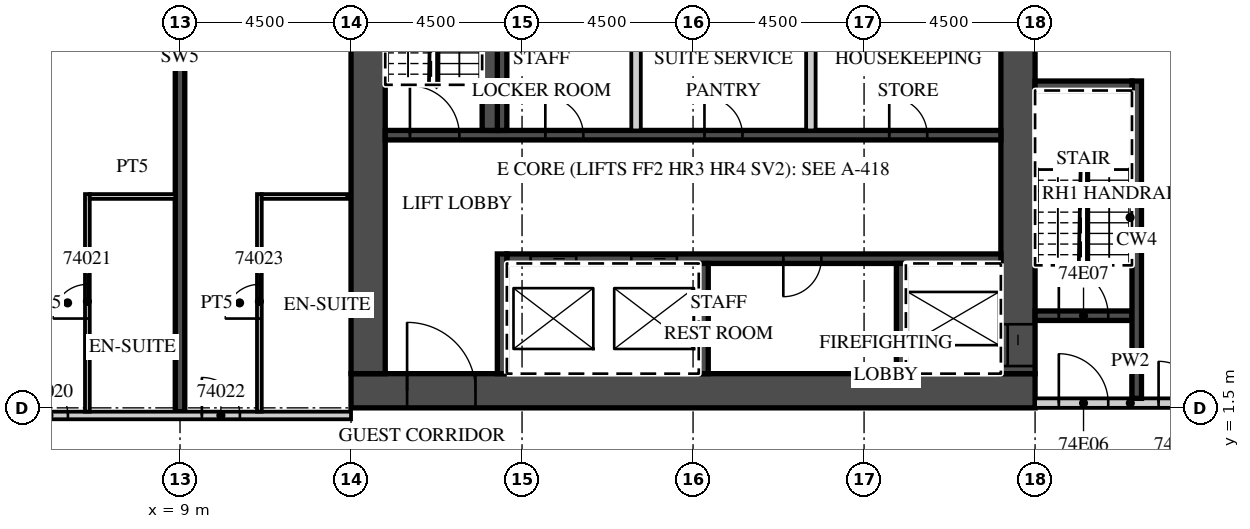
"""IFC4 building model, lengths in metres.
Left out: names, types, materials, properties, quantities, classifications, styles, units other than length and angle.
Written with IfcOpenShell. Run it as: python <this file> out.ifc"""

import sys

from ifc_helpers import new_model, si_unit, direction, frame, frame_2d, origin, place, context, subcontext, project, spatial, rectangle, extrude, element, fill, save


model = new_model("IFC4")
c1 = context("Model", 3, precision=1e-05, world=origin(), true_north=direction((0.0, 1.0)))
c2 = subcontext(c1, "Body", "Model", "MODEL_VIEW")
j1 = project(units=[si_unit("LENGTHUNIT", "METRE"), si_unit("PLANEANGLEUNIT", "RADIAN")], contexts=[c1])
p1 = place(None, origin())
s1 = spatial("IfcSite", under=j1, at=p1, CompositionType="ELEMENT")
p2 = place(p1, origin())
s2 = spatial("IfcBuilding", under=s1, at=p2, CompositionType="ELEMENT")
p3 = place(p2, frame((0.0, 0.0, 294.9)))
s3 = spatial("IfcBuildingStorey", under=s2, at=p3, CompositionType="ELEMENT", Elevation=294.9)
p4 = place(p3, frame((9.0, 1.4, 0.0), z_axis=(0.0, 0.0, 1.0), x_axis=(0.0, 1.0, 0.0)))
e1 = element("IfcWall", 1, at=p4, inside=s3, PredefinedType="SHEAR", context=c2, shape_type="SweptSolid", body=[
    extrude(rectangle(XDim=18.629, YDim=0.25, at=frame_2d((9.315, 0.0))), origin(), (0.0, 0.0, 1.0), 3.3),
])
p5 = place(p3, frame((38.132, -12.858, 0.0), z_axis=(0.0, 0.0, 1.0), x_axis=(-0.095847749461, 0.995396006082, 0.0)))
e2 = element("IfcWall", 2, at=p5, inside=s3, PredefinedType="SOLIDWALL", context=c2, shape_type="SweptSolid", body=[
    extrude(rectangle(XDim=32.0, YDim=0.45, at=frame_2d((16.0, 0.0))), origin(), (0.0, 0.0, 1.0), 3.02),
])
p6 = place(p3, frame((-39.909, 1.3, 0.0), z_axis=(0.0, 0.0, 1.0), x_axis=(1.0, 0.0, 0.0)))
e3 = element("IfcWall", 3, at=p6, inside=s3, PredefinedType="PARTITIONING", context=c2, shape_type="SweptSolid", body=[
    extrude(rectangle(XDim=53.409, YDim=0.2, at=frame_2d((26.705, 0.0))), origin(), (0.0, 0.0, 1.0), 3.02),
])
p7 = place(p6, frame((0.255, 0.0, 0.0)))
e4 = element("IfcOpeningElement", 4, at=p7, cuts=e3, PredefinedType="OPENING", context=c2, shape_type="SweptSolid", body=[
    extrude(rectangle(XDim=0.9, YDim=2.1, at=frame_2d((0.45, 1.05))), frame((0.0, 0.11, 0.0), z_axis=(0.0, -1.0, 0.0), x_axis=(1.0, 0.0, 0.0)), (0.0, 0.0, 1.0), 0.22),
])
p8 = place(p6, frame((4.484, 0.0, 0.0)))
e5 = element("IfcOpeningElement", 5, at=p8, cuts=e3, PredefinedType="OPENING", context=c2, shape_type="SweptSolid", body=[
    extrude(rectangle(XDim=1.0, YDim=2.1, at=frame_2d((0.5, 1.05))), frame((0.0, 0.11, 0.0), z_axis=(0.0, -1.0, 0.0), x_axis=(1.0, 0.0, 0.0)), (0.0, 0.0, 1.0), 0.22),
])
p9 = place(p6, frame((11.334, 0.0, 0.0)))
e6 = element("IfcOpeningElement", 6, at=p9, cuts=e3, PredefinedType="OPENING", context=c2, shape_type="SweptSolid", body=[
    extrude(rectangle(XDim=1.0, YDim=2.1, at=frame_2d((0.5, 1.05))), frame((0.0, 0.11, 0.0), z_axis=(0.0, -1.0, 0.0), x_axis=(1.0, 0.0, 0.0)), (0.0, 0.0, 1.0), 0.22),
])
p10 = place(p6, frame((15.347, 0.0, 0.0)))
e7 = element("IfcOpeningElement", 7, at=p10, cuts=e3, PredefinedType="OPENING", context=c2, shape_type="SweptSolid", body=[
    extrude(rectangle(XDim=1.2, YDim=2.1, at=frame_2d((0.6, 1.05))), frame((0.0, 0.11, 0.0), z_axis=(0.0, -1.0, 0.0), x_axis=(1.0, 0.0, 0.0)), (0.0, 0.0, 1.0), 0.22),
])
p11 = place(p6, frame((24.859, 0.0, 0.0)))
e8 = element("IfcOpeningElement", 8, at=p11, cuts=e3, PredefinedType="OPENING", context=c2, shape_type="SweptSolid", body=[
    extrude(rectangle(XDim=1.0, YDim=2.1, at=frame_2d((0.5, 1.05))), frame((0.0, 0.11, 0.0), z_axis=(0.0, -1.0, 0.0), x_axis=(1.0, 0.0, 0.0)), (0.0, 0.0, 1.0), 0.22),
])
p12 = place(p6, frame((26.959, 0.0, 0.0)))
e9 = element("IfcOpeningElement", 9, at=p12, cuts=e3, PredefinedType="OPENING", context=c2, shape_type="SweptSolid", body=[
    extrude(rectangle(XDim=1.0, YDim=2.1, at=frame_2d((0.5, 1.05))), frame((0.0, 0.11, 0.0), z_axis=(0.0, -1.0, 0.0), x_axis=(1.0, 0.0, 0.0)), (0.0, 0.0, 1.0), 0.22),
])
p13 = place(p6, frame((33.346, 0.0, 0.0)))
e10 = element("IfcOpeningElement", 10, at=p13, cuts=e3, PredefinedType="OPENING", context=c2, shape_type="SweptSolid", body=[
    extrude(rectangle(XDim=1.2, YDim=2.1, at=frame_2d((0.6, 1.05))), frame((0.0, 0.11, 0.0), z_axis=(0.0, -1.0, 0.0), x_axis=(1.0, 0.0, 0.0)), (0.0, 0.0, 1.0), 0.22),
])
p14 = place(p6, frame((42.859, 0.0, 0.0)))
e11 = element("IfcOpeningElement", 11, at=p14, cuts=e3, PredefinedType="OPENING", context=c2, shape_type="SweptSolid", body=[
    extrude(rectangle(XDim=1.0, YDim=2.1, at=frame_2d((0.5, 1.05))), frame((0.0, 0.11, 0.0), z_axis=(0.0, -1.0, 0.0), x_axis=(1.0, 0.0, 0.0)), (0.0, 0.0, 1.0), 0.22),
])
p15 = place(p6, frame((44.959, 0.0, 0.0)))
e12 = element("IfcOpeningElement", 12, at=p15, cuts=e3, PredefinedType="OPENING", context=c2, shape_type="SweptSolid", body=[
    extrude(rectangle(XDim=1.0, YDim=2.1, at=frame_2d((0.5, 1.05))), frame((0.0, 0.11, 0.0), z_axis=(0.0, -1.0, 0.0), x_axis=(1.0, 0.0, 0.0)), (0.0, 0.0, 1.0), 0.22),
])
p16 = place(p6, frame((49.484, 0.0, 0.0)))
e13 = element("IfcOpeningElement", 13, at=p16, cuts=e3, PredefinedType="OPENING", context=c2, shape_type="SweptSolid", body=[
    extrude(rectangle(XDim=1.0, YDim=2.1, at=frame_2d((0.5, 1.05))), frame((0.0, 0.11, 0.0), z_axis=(0.0, -1.0, 0.0), x_axis=(1.0, 0.0, 0.0)), (0.0, 0.0, 1.0), 0.22),
])
p17 = place(p3, frame((6.562, 1.4, 0.0), z_axis=(0.0, 0.0, 1.0), x_axis=(0.0, 1.0, 0.0)))
e14 = element("IfcWall", 14, at=p17, inside=s3, PredefinedType="PARTITIONING", context=c2, shape_type="SweptSolid", body=[
    extrude(rectangle(XDim=5.725, YDim=0.125, at=frame_2d((2.863, 0.0))), origin(), (0.0, 0.0, 1.0), 3.02),
])
p18 = place(p17, frame((2.45, 0.0, 0.0)))
e15 = element("IfcOpeningElement", 15, at=p18, cuts=e14, PredefinedType="OPENING", context=c2, shape_type="SweptSolid", body=[
    extrude(rectangle(XDim=0.9, YDim=2.1, at=frame_2d((0.45, 1.05))), frame((0.0, 0.073, 0.0), z_axis=(0.0, -1.0, 0.0), x_axis=(1.0, 0.0, 0.0)), (0.0, 0.0, 1.0), 0.145),
])
p19 = place(p3, frame((6.625, 7.062, 0.0), z_axis=(0.0, 0.0, 1.0), x_axis=(1.0, 0.0, 0.0)))
e16 = element("IfcWall", 16, at=p19, inside=s3, PredefinedType="PARTITIONING", context=c2, shape_type="SweptSolid", body=[
    extrude(rectangle(XDim=2.25, YDim=0.125, at=frame_2d((1.125, 0.0))), origin(), (0.0, 0.0, 1.0), 3.02),
])
p20 = place(p3, frame((11.088, 1.4, 0.0), z_axis=(0.0, 0.0, 1.0), x_axis=(0.0, 1.0, 0.0)))
e17 = element("IfcWall", 17, at=p20, inside=s3, PredefinedType="PARTITIONING", context=c2, shape_type="SweptSolid", body=[
    extrude(rectangle(XDim=5.725, YDim=0.125, at=frame_2d((2.863, 0.0))), origin(), (0.0, 0.0, 1.0), 3.02),
])
p21 = place(p20, frame((2.45, 0.0, 0.0)))
e18 = element("IfcOpeningElement", 18, at=p21, cuts=e17, PredefinedType="OPENING", context=c2, shape_type="SweptSolid", body=[
    extrude(rectangle(XDim=0.9, YDim=2.1, at=frame_2d((0.45, 1.05))), frame((0.0, 0.073, 0.0), z_axis=(0.0, -1.0, 0.0), x_axis=(1.0, 0.0, 0.0)), (0.0, 0.0, 1.0), 0.145),
])
p22 = place(p3, frame((11.15, 7.062, 0.0), z_axis=(0.0, 0.0, 1.0), x_axis=(1.0, 0.0, 0.0)))
e19 = element("IfcWall", 19, at=p22, inside=s3, PredefinedType="PARTITIONING", context=c2, shape_type="SweptSolid", body=[
    extrude(rectangle(XDim=2.25, YDim=0.125, at=frame_2d((1.125, 0.0))), origin(), (0.0, 0.0, 1.0), 3.02),
])
p23 = place(p3, frame((13.5, 1.95, 0.0), z_axis=(0.0, 0.0, 1.0), x_axis=(1.0, 0.0, 0.0)))
e20 = element("IfcWall", 20, at=p23, inside=s3, PredefinedType="SHEAR", context=c2, shape_type="SweptSolid", body=[
    extrude(rectangle(XDim=18.0, YDim=0.9, at=frame_2d((9.0, 0.0))), origin(), (0.0, 0.0, 1.0), 3.02),
])
p24 = place(p23, frame((1.475, 0.0, 0.0)))
e21 = element("IfcOpeningElement", 21, at=p24, cuts=e20, PredefinedType="OPENING", context=c2, shape_type="SweptSolid", body=[
    extrude(rectangle(XDim=1.8, YDim=2.1, at=frame_2d((0.9, 1.05))), frame((0.0, 0.46, 0.0), z_axis=(0.0, -1.0, 0.0), x_axis=(1.0, 0.0, 0.0)), (0.0, 0.0, 1.0), 0.92),
])
p25 = place(p3, frame((31.05, 2.4, 0.0), z_axis=(0.0, 0.0, 1.0), x_axis=(0.0, 1.0, 0.0)))
e22 = element("IfcWall", 22, at=p25, inside=s3, PredefinedType="SHEAR", context=c2, shape_type="SweptSolid", body=[
    extrude(rectangle(XDim=12.8, YDim=0.9, at=frame_2d((6.4, 0.0))), origin(), (0.0, 0.0, 1.0), 3.02),
])
p26 = place(p25, frame((0.2, 0.0, 0.0)))
e23 = element("IfcOpeningElement", 23, at=p26, cuts=e22, PredefinedType="OPENING", context=c2, shape_type="SweptSolid", body=[
    extrude(rectangle(XDim=1.1, YDim=2.1, at=frame_2d((0.55, 1.05))), frame((0.0, 0.46, 0.0), z_axis=(0.0, -1.0, 0.0), x_axis=(1.0, 0.0, 0.0)), (0.0, 0.0, 1.0), 0.92),
])
p27 = place(p3, frame((13.95, 2.4, 0.0), z_axis=(0.0, 0.0, 1.0), x_axis=(0.0, 1.0, 0.0)))
e24 = element("IfcWall", 24, at=p27, inside=s3, PredefinedType="SHEAR", context=c2, shape_type="SweptSolid", body=[
    extrude(rectangle(XDim=12.2, YDim=0.9, at=frame_2d((6.1, 0.0))), origin(), (0.0, 0.0, 1.0), 3.02),
])
p28 = place(p3, frame((17.6, 5.425, 0.0), z_axis=(0.0, 0.0, 1.0), x_axis=(1.0, 0.0, 0.0)))
e25 = element("IfcWall", 25, at=p28, inside=s3, PredefinedType="SHEAR", context=c2, shape_type="SweptSolid", body=[
    extrude(rectangle(XDim=13.0, YDim=0.25, at=frame_2d((6.5, 0.0))), origin(), (0.0, 0.0, 1.0), 3.02),
])
p29 = place(p28, frame((3.275, 0.0, 0.0)))
e26 = element("IfcOpeningElement", 26, at=p29, cuts=e25, PredefinedType="OPENING", context=c2, shape_type="SweptSolid", body=[
    extrude(rectangle(XDim=1.2, YDim=2.1, at=frame_2d((0.6, 1.05))), frame((0.0, 0.135, 0.0), z_axis=(0.0, -1.0, 0.0), x_axis=(1.0, 0.0, 0.0)), (0.0, 0.0, 1.0), 0.27),
])
p30 = place(p28, frame((0.625, 0.0, 0.0)))
e27 = element("IfcOpeningElement", 27, at=p30, cuts=e25, PredefinedType="OPENING", context=c2, shape_type="SweptSolid", body=[
    extrude(rectangle(XDim=1.2, YDim=2.1, at=frame_2d((0.6, 1.05))), frame((0.0, 0.135, 0.0), z_axis=(0.0, -1.0, 0.0), x_axis=(1.0, 0.0, 0.0)), (0.0, 0.0, 1.0), 0.27),
])
p31 = place(p28, frame((7.275, 0.0, 0.0)))
e28 = element("IfcOpeningElement", 28, at=p31, cuts=e25, PredefinedType="OPENING", context=c2, shape_type="SweptSolid", body=[
    extrude(rectangle(XDim=1.0, YDim=2.1, at=frame_2d((0.5, 1.05))), frame((0.0, 0.135, 0.0), z_axis=(0.0, -1.0, 0.0), x_axis=(1.0, 0.0, 0.0)), (0.0, 0.0, 1.0), 0.27),
])
p32 = place(p3, frame((17.475, 2.4, 0.0), z_axis=(0.0, 0.0, 1.0), x_axis=(0.0, 1.0, 0.0)))
e29 = element("IfcWall", 29, at=p32, inside=s3, PredefinedType="SHEAR", context=c2, shape_type="SweptSolid", body=[
    extrude(rectangle(XDim=3.15, YDim=0.25, at=frame_2d((1.575, 0.0))), origin(), (0.0, 0.0, 1.0), 3.02),
])
for number, where, z_axis, x_axis in (
    (30, (27.975, 2.4, 0.0), (0.0, 0.0, 1.0), (0.0, 1.0, 0.0)),
    (31, (22.775, 2.4, 0.0), (0.0, 0.0, 1.0), (0.0, 1.0, 0.0)),
):
    element("IfcWall", number, at=place(p3, frame(where, z_axis=z_axis, x_axis=x_axis)), inside=s3, PredefinedType="SHEAR", context=c2, shape_type="SweptSolid", body=[
        extrude(rectangle(XDim=2.9, YDim=0.25, at=frame_2d((1.45, 0.0))), origin(), (0.0, 0.0, 1.0), 3.02),
    ])
p33 = place(p3, frame((14.4, 8.675, 0.0), z_axis=(0.0, 0.0, 1.0), x_axis=(1.0, 0.0, 0.0)))
e32 = element("IfcWall", 32, at=p33, inside=s3, PredefinedType="SHEAR", context=c2, shape_type="SweptSolid", body=[
    extrude(rectangle(XDim=16.2, YDim=0.25, at=frame_2d((8.1, 0.0))), origin(), (0.0, 0.0, 1.0), 3.02),
])
p34 = place(p33, frame((0.65, 0.0, 0.0)))
e33 = element("IfcOpeningElement", 33, at=p34, cuts=e32, PredefinedType="OPENING", context=c2, shape_type="SweptSolid", body=[
    extrude(rectangle(XDim=1.3, YDim=2.1, at=frame_2d((0.65, 1.05))), frame((0.0, 0.135, 0.0), z_axis=(0.0, -1.0, 0.0), x_axis=(1.0, 0.0, 0.0)), (0.0, 0.0, 1.0), 0.27),
])
p35 = place(p33, frame((13.262, 0.0, 0.0)))
e34 = element("IfcOpeningElement", 34, at=p35, cuts=e32, PredefinedType="OPENING", context=c2, shape_type="SweptSolid", body=[
    extrude(rectangle(XDim=1.0, YDim=2.1, at=frame_2d((0.5, 1.05))), frame((0.0, 0.135, 0.0), z_axis=(0.0, -1.0, 0.0), x_axis=(1.0, 0.0, 0.0)), (0.0, 0.0, 1.0), 0.27),
])
p36 = place(p33, frame((8.4, 0.0, 0.0)))
e35 = element("IfcOpeningElement", 35, at=p36, cuts=e32, PredefinedType="OPENING", context=c2, shape_type="SweptSolid", body=[
    extrude(rectangle(XDim=1.0, YDim=2.1, at=frame_2d((0.5, 1.05))), frame((0.0, 0.135, 0.0), z_axis=(0.0, -1.0, 0.0), x_axis=(1.0, 0.0, 0.0)), (0.0, 0.0, 1.0), 0.27),
])
p37 = place(p33, frame((4.212, 0.0, 0.0)))
e36 = element("IfcOpeningElement", 36, at=p37, cuts=e32, PredefinedType="OPENING", context=c2, shape_type="SweptSolid", body=[
    extrude(rectangle(XDim=1.0, YDim=2.1, at=frame_2d((0.5, 1.05))), frame((0.0, 0.135, 0.0), z_axis=(0.0, -1.0, 0.0), x_axis=(1.0, 0.0, 0.0)), (0.0, 0.0, 1.0), 0.27),
])
p38 = place(p3, frame((17.475, 8.8, 0.0), z_axis=(0.0, 0.0, 1.0), x_axis=(0.0, 1.0, 0.0)))
e37 = element("IfcWall", 37, at=p38, inside=s3, PredefinedType="SHEAR", context=c2, shape_type="SweptSolid", body=[
    extrude(rectangle(XDim=2.9, YDim=0.25, at=frame_2d((1.45, 0.0))), origin(), (0.0, 0.0, 1.0), 3.02),
])
for number, where, z_axis, x_axis in (
    (38, (25.6, 8.8, 0.0), (0.0, 0.0, 1.0), (0.0, 1.0, 0.0)),
    (39, (21.0, 8.8, 0.0), (0.0, 0.0, 1.0), (0.0, 1.0, 0.0)),
):
    element("IfcWall", number, at=place(p3, frame(where, z_axis=z_axis, x_axis=x_axis)), inside=s3, PredefinedType="PARTITIONING", context=c2, shape_type="SweptSolid", body=[
        extrude(rectangle(XDim=2.9, YDim=0.25, at=frame_2d((1.45, 0.0))), origin(), (0.0, 0.0, 1.0), 3.02),
    ])
p39 = place(p3, frame((17.15, 8.8, 0.0), z_axis=(0.0, 0.0, 1.0), x_axis=(0.0, 1.0, 0.0)))
e40 = element("IfcWall", 40, at=p39, inside=s3, PredefinedType="SHEAR", context=c2, shape_type="SweptSolid", body=[
    extrude(rectangle(XDim=5.8, YDim=0.4, at=frame_2d((2.9, 0.0))), origin(), (0.0, 0.0, 1.0), 3.02),
])
p40 = place(p3, frame((31.5, 1.625, 0.0), z_axis=(0.0, 0.0, 1.0), x_axis=(1.0, 0.0, 0.0)))
e41 = element("IfcWall", 41, at=p40, inside=s3, PredefinedType="PARTITIONING", context=c2, shape_type="SweptSolid", body=[
    extrude(rectangle(XDim=5.012, YDim=0.25, at=frame_2d((2.506, 0.0))), origin(), (0.0, 0.0, 1.0), 3.02),
])
p41 = place(p40, frame((0.625, 0.0, 0.0)))
e42 = element("IfcOpeningElement", 42, at=p41, cuts=e41, PredefinedType="OPENING", context=c2, shape_type="SweptSolid", body=[
    extrude(rectangle(XDim=1.3, YDim=2.1, at=frame_2d((0.65, 1.05))), frame((0.0, 0.135, 0.0), z_axis=(0.0, -1.0, 0.0), x_axis=(1.0, 0.0, 0.0)), (0.0, 0.0, 1.0), 0.27),
])
p42 = place(p40, frame((3.25, 0.0, 0.0)))
e43 = element("IfcOpeningElement", 43, at=p42, cuts=e41, PredefinedType="OPENING", context=c2, shape_type="SweptSolid", body=[
    extrude(rectangle(XDim=1.1, YDim=2.1, at=frame_2d((0.55, 1.05))), frame((0.0, 0.135, 0.0), z_axis=(0.0, -1.0, 0.0), x_axis=(1.0, 0.0, 0.0)), (0.0, 0.0, 1.0), 0.27),
])
p43 = place(p3, frame((31.5, 3.925, 0.0), z_axis=(0.0, 0.0, 1.0), x_axis=(1.0, 0.0, 0.0)))
e44 = element("IfcWall", 44, at=p43, inside=s3, PredefinedType="SHEAR", context=c2, shape_type="SweptSolid", body=[
    extrude(rectangle(XDim=2.55, YDim=0.25, at=frame_2d((1.275, 0.0))), origin(), (0.0, 0.0, 1.0), 3.02),
])
p44 = place(p43, frame((0.625, 0.0, 0.0)))
e45 = element("IfcOpeningElement", 45, at=p44, cuts=e44, PredefinedType="OPENING", context=c2, shape_type="SweptSolid", body=[
    extrude(rectangle(XDim=1.3, YDim=2.1, at=frame_2d((0.65, 1.05))), frame((0.0, 0.135, 0.0), z_axis=(0.0, -1.0, 0.0), x_axis=(1.0, 0.0, 0.0)), (0.0, 0.0, 1.0), 0.27),
])
p45 = place(p3, frame((34.175, 1.75, 0.0), z_axis=(0.0, 0.0, 1.0), x_axis=(0.0, 1.0, 0.0)))
e46 = element("IfcWall", 46, at=p45, inside=s3, PredefinedType="SHEAR", context=c2, shape_type="SweptSolid", body=[
    extrude(rectangle(XDim=8.35, YDim=0.25, at=frame_2d((4.175, 0.0))), origin(), (0.0, 0.0, 1.0), 3.02),
])
p46 = place(p3, frame((31.5, 9.975, 0.0), z_axis=(0.0, 0.0, 1.0), x_axis=(1.0, 0.0, 0.0)))
e47 = element("IfcWall", 47, at=p46, inside=s3, PredefinedType="SHEAR", context=c2, shape_type="SweptSolid", body=[
    extrude(rectangle(XDim=2.55, YDim=0.25, at=frame_2d((1.275, 0.0))), origin(), (0.0, 0.0, 1.0), 3.02),
])
p47 = place(p15, origin())
e48 = element("IfcDoor", 48, at=p47, inside=s3, OperationType="SINGLE_SWING_LEFT", PredefinedType="DOOR", context=c2, shape_type="SweptSolid", body=[
    extrude(rectangle(XDim=1.0, YDim=2.1, at=frame_2d((0.5, 1.05))), frame((0.0, 0.025, 0.0), z_axis=(0.0, -1.0, 0.0), x_axis=(1.0, 0.0, 0.0)), (0.0, 0.0, 1.0), 0.05),
])
fill(e12, e48)
p48 = place(p18, origin())
e49 = element("IfcDoor", 49, at=p48, inside=s3, OperationType="SINGLE_SWING_LEFT", PredefinedType="DOOR", context=c2, shape_type="SweptSolid", body=[
    extrude(rectangle(XDim=0.9, YDim=2.1, at=frame_2d((0.45, 1.05))), frame((0.0, 0.025, 0.0), z_axis=(0.0, -1.0, 0.0), x_axis=(1.0, 0.0, 0.0)), (0.0, 0.0, 1.0), 0.05),
])
fill(e15, e49)
p49 = place(p16, origin())
e50 = element("IfcDoor", 50, at=p49, inside=s3, OperationType="SINGLE_SWING_LEFT", PredefinedType="DOOR", context=c2, shape_type="SweptSolid", body=[
    extrude(rectangle(XDim=1.0, YDim=2.1, at=frame_2d((0.5, 1.05))), frame((0.0, 0.025, 0.0), z_axis=(0.0, -1.0, 0.0), x_axis=(1.0, 0.0, 0.0)), (0.0, 0.0, 1.0), 0.05),
])
fill(e13, e50)
p50 = place(p21, origin())
e51 = element("IfcDoor", 51, at=p50, inside=s3, OperationType="SINGLE_SWING_LEFT", PredefinedType="DOOR", context=c2, shape_type="SweptSolid", body=[
    extrude(rectangle(XDim=0.9, YDim=2.1, at=frame_2d((0.45, 1.05))), frame((0.0, 0.025, 0.0), z_axis=(0.0, -1.0, 0.0), x_axis=(1.0, 0.0, 0.0)), (0.0, 0.0, 1.0), 0.05),
])
fill(e18, e51)
p51 = place(p29, origin())
e52 = element("IfcDoor", 52, at=p51, inside=s3, OperationType="SLIDING_TO_RIGHT", PredefinedType="DOOR", context=c2, shape_type="SweptSolid", body=[
    extrude(rectangle(XDim=1.2, YDim=2.1, at=frame_2d((0.6, 1.05))), frame((0.0, 0.025, 0.0), z_axis=(0.0, -1.0, 0.0), x_axis=(1.0, 0.0, 0.0)), (0.0, 0.0, 1.0), 0.05),
])
fill(e26, e52)
p52 = place(p30, origin())
e53 = element("IfcDoor", 53, at=p52, inside=s3, OperationType="SLIDING_TO_LEFT", PredefinedType="DOOR", context=c2, shape_type="SweptSolid", body=[
    extrude(rectangle(XDim=1.2, YDim=2.1, at=frame_2d((0.6, 1.05))), frame((0.0, 0.025, 0.0), z_axis=(0.0, -1.0, 0.0), x_axis=(1.0, 0.0, 0.0)), (0.0, 0.0, 1.0), 0.05),
])
fill(e27, e53)
p53 = place(p26, origin())
e54 = element("IfcDoor", 54, at=p53, inside=s3, OperationType="SLIDING_TO_LEFT", PredefinedType="DOOR", context=c2, shape_type="SweptSolid", body=[
    extrude(rectangle(XDim=1.1, YDim=2.1, at=frame_2d((0.55, 1.05))), frame((0.0, 0.025, 0.0), z_axis=(0.0, -1.0, 0.0), x_axis=(1.0, 0.0, 0.0)), (0.0, 0.0, 1.0), 0.05),
])
fill(e23, e54)
p54 = place(p24, origin())
e55 = element("IfcDoor", 55, at=p54, inside=s3, OperationType="DOUBLE_DOOR_DOUBLE_SWING", PredefinedType="DOOR", context=c2, shape_type="SweptSolid", body=[
    extrude(rectangle(XDim=1.8, YDim=2.1, at=frame_2d((0.9, 1.05))), frame((0.0, 0.025, 0.0), z_axis=(0.0, -1.0, 0.0), x_axis=(1.0, 0.0, 0.0)), (0.0, 0.0, 1.0), 0.05),
])
fill(e21, e55)
p55 = place(p41, origin())
e56 = element("IfcDoor", 56, at=p55, inside=s3, OperationType="SINGLE_SWING_LEFT", PredefinedType="DOOR", context=c2, shape_type="SweptSolid", body=[
    extrude(rectangle(XDim=1.3, YDim=2.1, at=frame_2d((0.65, 1.05))), frame((0.0, 0.025, 0.0), z_axis=(0.0, -1.0, 0.0), x_axis=(1.0, 0.0, 0.0)), (0.0, 0.0, 1.0), 0.05),
])
fill(e42, e56)
p56 = place(p44, origin())
e57 = element("IfcDoor", 57, at=p56, inside=s3, OperationType="SINGLE_SWING_LEFT", PredefinedType="DOOR", context=c2, shape_type="SweptSolid", body=[
    extrude(rectangle(XDim=1.3, YDim=2.1, at=frame_2d((0.65, 1.05))), frame((0.0, 0.025, 0.0), z_axis=(0.0, -1.0, 0.0), x_axis=(1.0, 0.0, 0.0)), (0.0, 0.0, 1.0), 0.05),
])
fill(e45, e57)
p57 = place(p42, origin())
e58 = element("IfcDoor", 58, at=p57, inside=s3, OperationType="SINGLE_SWING_LEFT", PredefinedType="DOOR", context=c2, shape_type="SweptSolid", body=[
    extrude(rectangle(XDim=1.1, YDim=2.1, at=frame_2d((0.55, 1.05))), frame((0.0, 0.025, 0.0), z_axis=(0.0, -1.0, 0.0), x_axis=(1.0, 0.0, 0.0)), (0.0, 0.0, 1.0), 0.05),
])
fill(e43, e58)
p58 = place(p34, origin())
e59 = element("IfcDoor", 59, at=p58, inside=s3, OperationType="SINGLE_SWING_LEFT", PredefinedType="DOOR", context=c2, shape_type="SweptSolid", body=[
    extrude(rectangle(XDim=1.3, YDim=2.1, at=frame_2d((0.65, 1.05))), frame((0.0, 0.025, 0.0), z_axis=(0.0, -1.0, 0.0), x_axis=(1.0, 0.0, 0.0)), (0.0, 0.0, 1.0), 0.05),
])
fill(e33, e59)
p59 = place(p35, origin())
e60 = element("IfcDoor", 60, at=p59, inside=s3, OperationType="SINGLE_SWING_LEFT", PredefinedType="DOOR", context=c2, shape_type="SweptSolid", body=[
    extrude(rectangle(XDim=1.0, YDim=2.1, at=frame_2d((0.5, 1.05))), frame((0.0, 0.025, 0.0), z_axis=(0.0, -1.0, 0.0), x_axis=(1.0, 0.0, 0.0)), (0.0, 0.0, 1.0), 0.05),
])
fill(e34, e60)
p60 = place(p36, origin())
e61 = element("IfcDoor", 61, at=p60, inside=s3, OperationType="SINGLE_SWING_LEFT", PredefinedType="DOOR", context=c2, shape_type="SweptSolid", body=[
    extrude(rectangle(XDim=1.0, YDim=2.1, at=frame_2d((0.5, 1.05))), frame((0.0, 0.025, 0.0), z_axis=(0.0, -1.0, 0.0), x_axis=(1.0, 0.0, 0.0)), (0.0, 0.0, 1.0), 0.05),
])
fill(e35, e61)
p61 = place(p37, origin())
e62 = element("IfcDoor", 62, at=p61, inside=s3, OperationType="SINGLE_SWING_LEFT", PredefinedType="DOOR", context=c2, shape_type="SweptSolid", body=[
    extrude(rectangle(XDim=1.0, YDim=2.1, at=frame_2d((0.5, 1.05))), frame((0.0, 0.025, 0.0), z_axis=(0.0, -1.0, 0.0), x_axis=(1.0, 0.0, 0.0)), (0.0, 0.0, 1.0), 0.05),
])
fill(e36, e62)
p62 = place(p31, origin())
e63 = element("IfcDoor", 63, at=p62, inside=s3, OperationType="SINGLE_SWING_LEFT", PredefinedType="DOOR", context=c2, shape_type="SweptSolid", body=[
    extrude(rectangle(XDim=1.0, YDim=2.1, at=frame_2d((0.5, 1.05))), frame((0.0, 0.025, 0.0), z_axis=(0.0, -1.0, 0.0), x_axis=(1.0, 0.0, 0.0)), (0.0, 0.0, 1.0), 0.05),
])
fill(e28, e63)
save(model, sys.argv[1])
